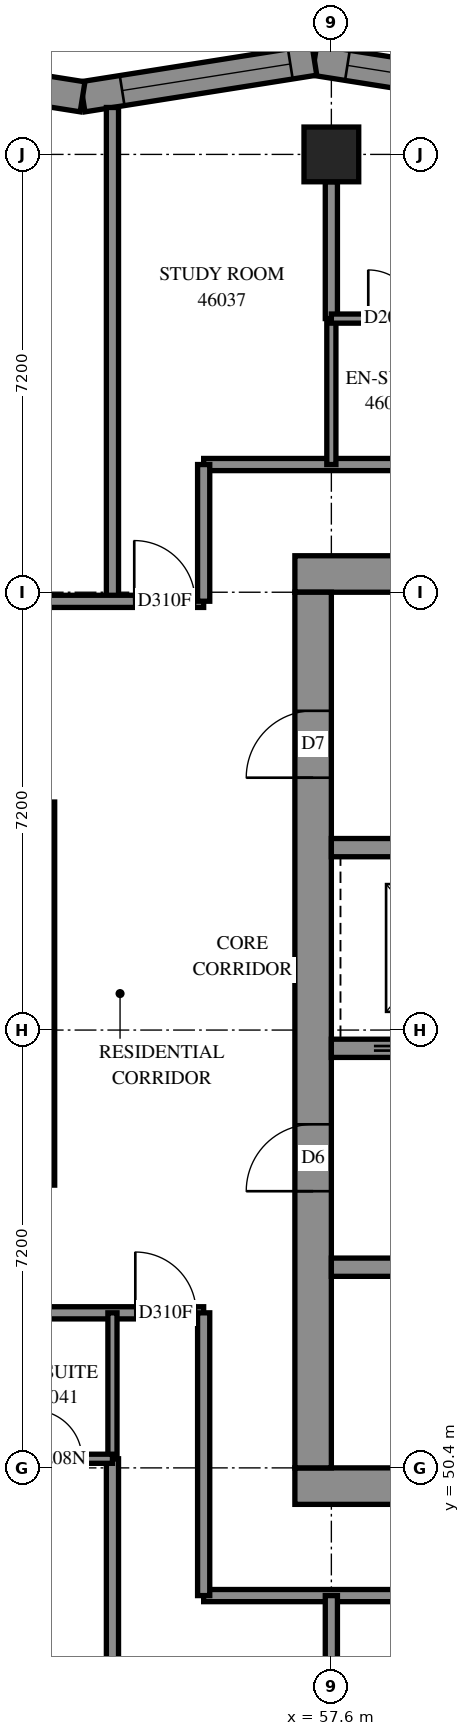
"""IFC4 building model, lengths in metres.
Left out: names, types, materials, properties, quantities, classifications, styles, units other than length and angle.
Written with IfcOpenShell. Run it as: python <this file> out.ifc"""

import sys

from ifc_helpers import new_model, si_unit, direction, frame, frame_2d, origin, origin_2d, place, context, subcontext, project, spatial, polyline, rectangle, outline, extrude, element, fill, save


model = new_model("IFC4")
c1 = context("Model", 3, precision=1e-05, world=origin(), true_north=direction((0.0, 1.0)))
c2 = subcontext(c1, "Body", "Model", "MODEL_VIEW")
j1 = project(units=[si_unit("LENGTHUNIT", "METRE"), si_unit("PLANEANGLEUNIT", "RADIAN")], contexts=[c1])
p1 = place(None, origin())
s1 = spatial("IfcSite", under=j1, at=p1, CompositionType="ELEMENT")
p2 = place(p1, origin())
s2 = spatial("IfcBuilding", under=s1, at=p2, CompositionType="ELEMENT")
p3 = place(p2, frame((0.0, 0.0, 169.4)))
s3 = spatial("IfcBuildingStorey", under=s2, at=p3, CompositionType="ELEMENT", Elevation=169.4)
p4 = place(p3, frame((57.6, 72.0, 0.0), z_axis=(0.0, 0.0, 1.0), x_axis=(1.0, 0.0, 0.0)))
e1 = element("IfcColumn", 1, at=p4, inside=s3, PredefinedType="COLUMN", context=c2, shape_type="SweptSolid", body=[
    extrude(rectangle(XDim=0.9, YDim=0.9, at=origin_2d()), origin(), (0.0, 0.0, 1.0), 3.1),
])
p5 = place(p3, frame((57.0, 50.1, -0.3), z_axis=(0.0, 0.0, 1.0), x_axis=(1.0, 0.0, 0.0)))
e2 = element("IfcWall", 2, at=p5, inside=s3, PredefinedType="SHEAR", context=c2, shape_type="SweptSolid", body=[
    extrude(rectangle(XDim=15.6, YDim=0.6, at=frame_2d((7.8, 0.0))), origin(), (0.0, 0.0, 1.0), 2.7),
])
p6 = place(p3, frame((57.0, 65.1, -0.3), z_axis=(0.0, 0.0, 1.0), x_axis=(1.0, 0.0, 0.0)))
e3 = element("IfcWall", 3, at=p6, inside=s3, PredefinedType="SHEAR", context=c2, shape_type="SweptSolid", body=[
    extrude(rectangle(XDim=15.6, YDim=0.6, at=frame_2d((7.8, 0.0))), origin(), (0.0, 0.0, 1.0), 2.7),
])
p7 = place(p6, frame((10.6, 0.0, 0.3)))
e4 = element("IfcOpeningElement", 4, at=p7, cuts=e3, PredefinedType="OPENING", context=c2, shape_type="SweptSolid", body=[
    extrude(rectangle(XDim=0.8, YDim=2.1, at=frame_2d((0.4, 1.05))), frame((0.0, 0.31, 0.0), z_axis=(0.0, -1.0, 0.0), x_axis=(1.0, 0.0, 0.0)), (0.0, 0.0, 1.0), 0.62),
])
p8 = place(p3, frame((57.3, 50.4, -0.3), z_axis=(0.0, 0.0, 1.0), x_axis=(0.0, 1.0, 0.0)))
e5 = element("IfcWall", 5, at=p8, inside=s3, PredefinedType="SHEAR", context=c2, shape_type="SweptSolid", body=[
    extrude(rectangle(XDim=14.4, YDim=0.6, at=frame_2d((7.2, 0.0))), origin(), (0.0, 0.0, 1.0), 2.7),
])
p9 = place(p8, frame((4.55, 0.0, 0.3)))
e6 = element("IfcOpeningElement", 6, at=p9, cuts=e5, PredefinedType="OPENING", context=c2, shape_type="SweptSolid", body=[
    extrude(rectangle(XDim=1.1, YDim=2.1, at=frame_2d((0.55, 1.05))), frame((0.0, 0.31, 0.0), z_axis=(0.0, -1.0, 0.0), x_axis=(1.0, 0.0, 0.0)), (0.0, 0.0, 1.0), 0.62),
])
p10 = place(p8, frame((11.35, 0.0, 0.3)))
e7 = element("IfcOpeningElement", 7, at=p10, cuts=e5, PredefinedType="OPENING", context=c2, shape_type="SweptSolid", body=[
    extrude(rectangle(XDim=1.1, YDim=2.1, at=frame_2d((0.55, 1.05))), frame((0.0, 0.31, 0.0), z_axis=(0.0, -1.0, 0.0), x_axis=(1.0, 0.0, 0.0)), (0.0, 0.0, 1.0), 0.62),
])
p11 = place(p3, frame((57.6, 53.7, 0.0), z_axis=(0.0, 0.0, 1.0), x_axis=(1.0, 0.0, 0.0)))
e8 = element("IfcWall", 8, at=p11, inside=s3, PredefinedType="SOLIDWALL", context=c2, shape_type="SweptSolid", body=[
    extrude(rectangle(XDim=14.4, YDim=0.3, at=frame_2d((7.2, 0.0))), origin(), (0.0, 0.0, 1.0), 3.1),
])
p12 = place(p11, frame((1.35, 0.0, 0.0)))
e9 = element("IfcOpeningElement", 9, at=p12, cuts=e8, PredefinedType="OPENING", context=c2, shape_type="SweptSolid", body=[
    extrude(rectangle(XDim=0.9, YDim=2.1, at=frame_2d((0.45, 1.05))), frame((0.0, 0.16, 0.0), z_axis=(0.0, -1.0, 0.0), x_axis=(1.0, 0.0, 0.0)), (0.0, 0.0, 1.0), 0.32),
])
p13 = place(p11, frame((4.95, 0.0, 0.0)))
e10 = element("IfcOpeningElement", 10, at=p13, cuts=e8, PredefinedType="OPENING", context=c2, shape_type="SweptSolid", body=[
    extrude(rectangle(XDim=0.9, YDim=2.1, at=frame_2d((0.45, 1.05))), frame((0.0, 0.16, 0.0), z_axis=(0.0, -1.0, 0.0), x_axis=(1.0, 0.0, 0.0)), (0.0, 0.0, 1.0), 0.32),
])
p14 = place(p11, frame((8.55, 0.0, 0.0)))
e11 = element("IfcOpeningElement", 11, at=p14, cuts=e8, PredefinedType="OPENING", context=c2, shape_type="SweptSolid", body=[
    extrude(rectangle(XDim=0.9, YDim=2.1, at=frame_2d((0.45, 1.05))), frame((0.0, 0.16, 0.0), z_axis=(0.0, -1.0, 0.0), x_axis=(1.0, 0.0, 0.0)), (0.0, 0.0, 1.0), 0.32),
])
p15 = place(p11, frame((12.05, 0.0, 0.0)))
e12 = element("IfcOpeningElement", 12, at=p15, cuts=e8, PredefinedType="OPENING", context=c2, shape_type="SweptSolid", body=[
    extrude(rectangle(XDim=1.1, YDim=2.1, at=frame_2d((0.55, 1.05))), frame((0.0, 0.16, 0.0), z_axis=(0.0, -1.0, 0.0), x_axis=(1.0, 0.0, 0.0)), (0.0, 0.0, 1.0), 0.32),
])
p16 = place(p3, frame((57.6, 57.3, 0.0), z_axis=(0.0, 0.0, 1.0), x_axis=(1.0, 0.0, 0.0)))
e13 = element("IfcWall", 13, at=p16, inside=s3, PredefinedType="SOLIDWALL", context=c2, shape_type="SweptSolid", body=[
    extrude(rectangle(XDim=14.4, YDim=0.3, at=frame_2d((7.2, 0.0))), origin(), (0.0, 0.0, 1.0), 3.1),
])
p17 = place(p16, frame((1.25, 0.0, 0.0)))
e14 = element("IfcOpeningElement", 14, at=p17, cuts=e13, PredefinedType="OPENING", context=c2, shape_type="SweptSolid", body=[
    extrude(rectangle(XDim=1.1, YDim=2.1, at=frame_2d((0.55, 1.05))), frame((0.0, 0.16, 0.0), z_axis=(0.0, -1.0, 0.0), x_axis=(1.0, 0.0, 0.0)), (0.0, 0.0, 1.0), 0.32),
])
p18 = place(p16, frame((4.85, 0.0, 0.0)))
e15 = element("IfcOpeningElement", 15, at=p18, cuts=e13, PredefinedType="OPENING", context=c2, shape_type="SweptSolid", body=[
    extrude(rectangle(XDim=1.1, YDim=2.1, at=frame_2d((0.55, 1.05))), frame((0.0, 0.16, 0.0), z_axis=(0.0, -1.0, 0.0), x_axis=(1.0, 0.0, 0.0)), (0.0, 0.0, 1.0), 0.32),
])
p19 = place(p16, frame((8.45, 0.0, 0.0)))
e16 = element("IfcOpeningElement", 16, at=p19, cuts=e13, PredefinedType="OPENING", context=c2, shape_type="SweptSolid", body=[
    extrude(rectangle(XDim=1.1, YDim=2.1, at=frame_2d((0.55, 1.05))), frame((0.0, 0.16, 0.0), z_axis=(0.0, -1.0, 0.0), x_axis=(1.0, 0.0, 0.0)), (0.0, 0.0, 1.0), 0.32),
])
p20 = place(p16, frame((12.05, 0.0, 0.0)))
e17 = element("IfcOpeningElement", 17, at=p20, cuts=e13, PredefinedType="OPENING", context=c2, shape_type="SweptSolid", body=[
    extrude(rectangle(XDim=1.1, YDim=2.1, at=frame_2d((0.55, 1.05))), frame((0.0, 0.16, 0.0), z_axis=(0.0, -1.0, 0.0), x_axis=(1.0, 0.0, 0.0)), (0.0, 0.0, 1.0), 0.32),
])
p21 = place(p3, frame((57.6, 60.6, 0.0), z_axis=(0.0, 0.0, 1.0), x_axis=(1.0, 0.0, 0.0)))
e18 = element("IfcWall", 18, at=p21, inside=s3, PredefinedType="SOLIDWALL", context=c2, shape_type="SweptSolid", body=[
    extrude(rectangle(XDim=7.2, YDim=0.3, at=frame_2d((3.6, 0.0))), origin(), (0.0, 0.0, 1.0), 3.1),
])
p22 = place(p3, frame((61.133, 72.947, 0.0), z_axis=(0.0, 0.0, 1.0), x_axis=(-0.9877213372, 0.1562259905, 0.0)))
e19 = element("IfcWall", 19, at=p22, inside=s3, PredefinedType="SOLIDWALL", context=c2, shape_type="SweptSolid", body=[
    extrude(outline(polyline([(0.04, -0.25), (3.899, -0.25), (3.82, 0.25), (-0.04, 0.25), (0.04, -0.25)])), origin(), (0.0, 0.0, 1.0), 3.1),
])
p23 = place(p22, frame((0.51, 0.0, 0.45)))
e20 = element("IfcOpeningElement", 20, at=p23, cuts=e19, PredefinedType="OPENING", context=c2, shape_type="SweptSolid", body=[
    extrude(rectangle(XDim=2.8, YDim=2.5, at=frame_2d((1.4, 1.25))), frame((0.0, 0.26, 0.0), z_axis=(0.0, -1.0, 0.0), x_axis=(1.0, 0.0, 0.0)), (0.0, 0.0, 1.0), 0.52),
])
p24 = place(p3, frame((57.321, 73.55, 0.0), z_axis=(0.0, 0.0, 1.0), x_axis=(-0.9877213372, -0.1562259905, 0.0)))
e21 = element("IfcWall", 21, at=p24, inside=s3, PredefinedType="SOLIDWALL", context=c2, shape_type="SweptSolid", body=[
    extrude(outline(polyline([(-0.04, -0.25), (3.82, -0.25), (3.899, 0.25), (0.04, 0.25), (-0.04, -0.25)])), origin(), (0.0, 0.0, 1.0), 3.1),
])
p25 = place(p24, frame((0.401, 0.0, 0.45)))
e22 = element("IfcOpeningElement", 22, at=p25, cuts=e21, PredefinedType="OPENING", context=c2, shape_type="SweptSolid", body=[
    extrude(rectangle(XDim=2.8, YDim=2.5, at=frame_2d((1.4, 1.25))), frame((0.0, 0.26, 0.0), z_axis=(0.0, -1.0, 0.0), x_axis=(1.0, 0.0, 0.0)), (0.0, 0.0, 1.0), 0.52),
])
p26 = place(p3, frame((53.509, 72.947, 0.0), z_axis=(0.0, 0.0, 1.0), x_axis=(-0.9877213372, 0.1562259905, 0.0)))
e23 = element("IfcWall", 23, at=p26, inside=s3, PredefinedType="SOLIDWALL", context=c2, shape_type="SweptSolid", body=[
    extrude(outline(polyline([(0.04, -0.25), (3.899, -0.25), (3.82, 0.25), (-0.04, 0.25), (0.04, -0.25)])), origin(), (0.0, 0.0, 1.0), 3.1),
])
p27 = place(p26, frame((1.074, 0.0, 0.45)))
e24 = element("IfcOpeningElement", 24, at=p27, cuts=e23, PredefinedType="OPENING", context=c2, shape_type="SweptSolid", body=[
    extrude(rectangle(XDim=1.2, YDim=2.5, at=frame_2d((0.6, 1.25))), frame((0.0, 0.26, 0.0), z_axis=(0.0, -1.0, 0.0), x_axis=(1.0, 0.0, 0.0)), (0.0, 0.0, 1.0), 0.52),
])
p28 = place(p3, frame((55.5, 48.3, 0.0), z_axis=(0.0, 0.0, 1.0), x_axis=(1.0, 0.0, 0.0)))
e25 = element("IfcWall", 25, at=p28, inside=s3, PredefinedType="PARTITIONING", context=c2, shape_type="SweptSolid", body=[
    extrude(rectangle(XDim=18.974, YDim=0.2, at=frame_2d((9.487, 0.0))), origin(), (0.0, 0.0, 1.0), 3.1),
])
p29 = place(p28, frame((5.963, 0.0, 0.0)))
e26 = element("IfcOpeningElement", 26, at=p29, cuts=e25, PredefinedType="OPENING", context=c2, shape_type="SweptSolid", body=[
    extrude(rectangle(XDim=1.0, YDim=2.1, at=frame_2d((0.5, 1.05))), frame((0.0, 0.11, 0.0), z_axis=(0.0, -1.0, 0.0), x_axis=(1.0, 0.0, 0.0)), (0.0, 0.0, 1.0), 0.22),
])
p30 = place(p28, frame((13.161, 0.0, 0.0)))
e27 = element("IfcOpeningElement", 27, at=p30, cuts=e25, PredefinedType="OPENING", context=c2, shape_type="SweptSolid", body=[
    extrude(rectangle(XDim=0.9, YDim=2.1, at=frame_2d((0.45, 1.05))), frame((0.0, 0.11, 0.0), z_axis=(0.0, -1.0, 0.0), x_axis=(1.0, 0.0, 0.0)), (0.0, 0.0, 1.0), 0.22),
])
p31 = place(p3, frame((55.5, 66.9, 0.0), z_axis=(0.0, 0.0, 1.0), x_axis=(1.0, 0.0, 0.0)))
e28 = element("IfcWall", 28, at=p31, inside=s3, PredefinedType="PARTITIONING", context=c2, shape_type="SweptSolid", body=[
    extrude(rectangle(XDim=18.6, YDim=0.2, at=frame_2d((9.3, 0.0))), origin(), (0.0, 0.0, 1.0), 3.1),
])
p32 = place(p31, frame((4.45, 0.0, 0.0)))
e29 = element("IfcOpeningElement", 29, at=p32, cuts=e28, PredefinedType="OPENING", context=c2, shape_type="SweptSolid", body=[
    extrude(rectangle(XDim=0.9, YDim=2.1, at=frame_2d((0.45, 1.05))), frame((0.0, 0.11, 0.0), z_axis=(0.0, -1.0, 0.0), x_axis=(1.0, 0.0, 0.0)), (0.0, 0.0, 1.0), 0.22),
])
p33 = place(p31, frame((6.1, 0.0, 0.0)))
e30 = element("IfcOpeningElement", 30, at=p33, cuts=e28, PredefinedType="OPENING", context=c2, shape_type="SweptSolid", body=[
    extrude(rectangle(XDim=0.9, YDim=2.1, at=frame_2d((0.45, 1.05))), frame((0.0, 0.11, 0.0), z_axis=(0.0, -1.0, 0.0), x_axis=(1.0, 0.0, 0.0)), (0.0, 0.0, 1.0), 0.22),
])
p34 = place(p31, frame((11.65, 0.0, 0.0)))
e31 = element("IfcOpeningElement", 31, at=p34, cuts=e28, PredefinedType="OPENING", context=c2, shape_type="SweptSolid", body=[
    extrude(rectangle(XDim=0.9, YDim=2.1, at=frame_2d((0.45, 1.05))), frame((0.0, 0.11, 0.0), z_axis=(0.0, -1.0, 0.0), x_axis=(1.0, 0.0, 0.0)), (0.0, 0.0, 1.0), 0.22),
])
p35 = place(p31, frame((13.3, 0.0, 0.0)))
e32 = element("IfcOpeningElement", 32, at=p35, cuts=e28, PredefinedType="OPENING", context=c2, shape_type="SweptSolid", body=[
    extrude(rectangle(XDim=0.9, YDim=2.1, at=frame_2d((0.45, 1.05))), frame((0.0, 0.11, 0.0), z_axis=(0.0, -1.0, 0.0), x_axis=(1.0, 0.0, 0.0)), (0.0, 0.0, 1.0), 0.22),
])
p36 = place(p3, frame((54.0, 42.261, 0.0), z_axis=(0.0, 0.0, 1.0), x_axis=(0.0, 1.0, 0.0)))
e33 = element("IfcWall", 33, at=p36, inside=s3, PredefinedType="PARTITIONING", context=c2, shape_type="SweptSolid", body=[
    extrude(rectangle(XDim=8.289, YDim=0.2, at=frame_2d((4.144, 0.0))), origin(), (0.0, 0.0, 1.0), 3.1),
])
p37 = place(p3, frame((54.0, 64.65, 0.0), z_axis=(0.0, 0.0, 1.0), x_axis=(0.0, 1.0, 0.0)))
e34 = element("IfcWall", 34, at=p37, inside=s3, PredefinedType="PARTITIONING", context=c2, shape_type="SweptSolid", body=[
    extrude(rectangle(XDim=8.121, YDim=0.2, at=frame_2d((4.061, 0.0))), origin(), (0.0, 0.0, 1.0), 3.1),
])
p38 = place(p3, frame((52.95, 55.05, 0.0), z_axis=(0.0, 0.0, 1.0), x_axis=(0.0, 1.0, 0.0)))
e35 = element("IfcWall", 35, at=p38, inside=s3, PredefinedType="PARTITIONING", context=c2, shape_type="SweptSolid", body=[
    extrude(rectangle(XDim=6.3, YDim=0.2, at=frame_2d((3.15, 0.0))), origin(), (0.0, 0.0, 1.0), 3.1),
])
p39 = place(p3, frame((50.4, 52.95, 0.0), z_axis=(0.0, 0.0, 1.0), x_axis=(1.0, 0.0, 0.0)))
e36 = element("IfcWall", 36, at=p39, inside=s3, PredefinedType="PARTITIONING", context=c2, shape_type="SweptSolid", body=[
    extrude(rectangle(XDim=5.1, YDim=0.2, at=frame_2d((2.55, 0.0))), origin(), (0.0, 0.0, 1.0), 3.1),
])
p40 = place(p39, frame((0.4, 0.0, 0.0)))
e37 = element("IfcOpeningElement", 37, at=p40, cuts=e36, PredefinedType="OPENING", context=c2, shape_type="SweptSolid", body=[
    extrude(rectangle(XDim=0.9, YDim=2.1, at=frame_2d((0.45, 1.05))), frame((0.0, 0.11, 0.0), z_axis=(0.0, -1.0, 0.0), x_axis=(1.0, 0.0, 0.0)), (0.0, 0.0, 1.0), 0.22),
])
p41 = place(p39, frame((3.976, 0.0, 0.0)))
e38 = element("IfcOpeningElement", 38, at=p41, cuts=e36, PredefinedType="OPENING", context=c2, shape_type="SweptSolid", body=[
    extrude(rectangle(XDim=1.0, YDim=2.1, at=frame_2d((0.5, 1.05))), frame((0.0, 0.11, 0.0), z_axis=(0.0, -1.0, 0.0), x_axis=(1.0, 0.0, 0.0)), (0.0, 0.0, 1.0), 0.22),
])
p42 = place(p3, frame((55.5, 48.3, 0.0), z_axis=(0.0, 0.0, 1.0), x_axis=(0.0, 1.0, 0.0)))
e39 = element("IfcWall", 39, at=p42, inside=s3, PredefinedType="PARTITIONING", context=c2, shape_type="SweptSolid", body=[
    extrude(rectangle(XDim=4.65, YDim=0.2, at=frame_2d((2.325, 0.0))), origin(), (0.0, 0.0, 1.0), 3.1),
])
p43 = place(p3, frame((50.85, 64.65, 0.0), z_axis=(0.0, 0.0, 1.0), x_axis=(1.0, 0.0, 0.0)))
e40 = element("IfcWall", 40, at=p43, inside=s3, PredefinedType="PARTITIONING", context=c2, shape_type="SweptSolid", body=[
    extrude(rectangle(XDim=4.65, YDim=0.2, at=frame_2d((2.325, 0.0))), origin(), (0.0, 0.0, 1.0), 3.1),
])
p44 = place(p43, frame((3.509, 0.0, 0.0)))
e41 = element("IfcOpeningElement", 41, at=p44, cuts=e40, PredefinedType="OPENING", context=c2, shape_type="SweptSolid", body=[
    extrude(rectangle(XDim=1.0, YDim=2.1, at=frame_2d((0.5, 1.05))), frame((0.0, 0.11, 0.0), z_axis=(0.0, -1.0, 0.0), x_axis=(1.0, 0.0, 0.0)), (0.0, 0.0, 1.0), 0.22),
])
p45 = place(p3, frame((57.6, 43.65, 0.0), z_axis=(0.0, 0.0, 1.0), x_axis=(0.0, 1.0, 0.0)))
e42 = element("IfcWall", 42, at=p45, inside=s3, PredefinedType="PARTITIONING", context=c2, shape_type="SweptSolid", body=[
    extrude(rectangle(XDim=4.65, YDim=0.2, at=frame_2d((2.325, 0.0))), origin(), (0.0, 0.0, 1.0), 3.1),
])
for number, where, z_axis, x_axis in (
    (43, (54.0, 50.55, 0.0), (0.0, 0.0, 1.0), (0.0, 1.0, 0.0)),
    (44, (57.6, 66.9, 0.0), (0.0, 0.0, 1.0), (0.0, 1.0, 0.0)),
):
    element("IfcWall", number, at=place(p3, frame(where, z_axis=z_axis, x_axis=x_axis)), inside=s3, PredefinedType="PARTITIONING", context=c2, shape_type="SweptSolid", body=[
        extrude(rectangle(XDim=2.4, YDim=0.15, at=frame_2d((1.2, 0.0))), origin(), (0.0, 0.0, 1.0), 3.1),
    ])
p46 = place(p3, frame((57.6, 69.3, 0.0), z_axis=(0.0, 0.0, 1.0), x_axis=(0.0, 1.0, 0.0)))
e45 = element("IfcWall", 45, at=p46, inside=s3, PredefinedType="PARTITIONING", context=c2, shape_type="SweptSolid", body=[
    extrude(rectangle(XDim=2.25, YDim=0.2, at=frame_2d((1.125, 0.0))), origin(), (0.0, 0.0, 1.0), 3.1),
])
p47 = place(p3, frame((55.5, 64.652, 0.0), z_axis=(0.0, 0.0, 1.0), x_axis=(0.0, 1.0, 0.0)))
e46 = element("IfcWall", 46, at=p47, inside=s3, PredefinedType="PARTITIONING", context=c2, shape_type="SweptSolid", body=[
    extrude(rectangle(XDim=2.248, YDim=0.2, at=frame_2d((1.124, 0.0))), origin(), (0.0, 0.0, 1.0), 3.1),
])
p48 = place(p3, frame((52.1, 50.55, 0.0), z_axis=(0.0, 0.0, 1.0), x_axis=(1.0, 0.0, 0.0)))
e47 = element("IfcWall", 47, at=p48, inside=s3, PredefinedType="PARTITIONING", context=c2, shape_type="SweptSolid", body=[
    extrude(rectangle(XDim=1.9, YDim=0.15, at=frame_2d((0.95, 0.0))), origin(), (0.0, 0.0, 1.0), 3.1),
])
p49 = place(p48, frame((0.598, 0.0, 0.0)))
e48 = element("IfcOpeningElement", 48, at=p49, cuts=e47, PredefinedType="OPENING", context=c2, shape_type="SweptSolid", body=[
    extrude(rectangle(XDim=0.8, YDim=2.1, at=frame_2d((0.4, 1.05))), frame((0.0, 0.085, 0.0), z_axis=(0.0, -1.0, 0.0), x_axis=(1.0, 0.0, 0.0)), (0.0, 0.0, 1.0), 0.17),
])
p50 = place(p3, frame((57.6, 69.3, 0.0), z_axis=(0.0, 0.0, 1.0), x_axis=(1.0, 0.0, 0.0)))
e49 = element("IfcWall", 49, at=p50, inside=s3, PredefinedType="PARTITIONING", context=c2, shape_type="SweptSolid", body=[
    extrude(rectangle(XDim=1.9, YDim=0.15, at=frame_2d((0.95, 0.0))), origin(), (0.0, 0.0, 1.0), 3.1),
])
p51 = place(p50, frame((0.607, 0.0, 0.0)))
e50 = element("IfcOpeningElement", 50, at=p51, cuts=e49, PredefinedType="OPENING", context=c2, shape_type="SweptSolid", body=[
    extrude(rectangle(XDim=0.8, YDim=2.1, at=frame_2d((0.4, 1.05))), frame((0.0, 0.085, 0.0), z_axis=(0.0, -1.0, 0.0), x_axis=(1.0, 0.0, 0.0)), (0.0, 0.0, 1.0), 0.17),
])
p52 = place(p23, origin())
e51 = element("IfcWindow", 51, at=p52, inside=s3, PartitioningType="SINGLE_PANEL", PredefinedType="WINDOW", context=c2, shape_type="SweptSolid", body=[
    extrude(rectangle(XDim=2.8, YDim=2.5, at=frame_2d((1.4, 1.25))), frame((0.0, 0.18, 0.0), z_axis=(0.0, -1.0, 0.0), x_axis=(1.0, 0.0, 0.0)), (0.0, 0.0, 1.0), 0.06),
])
fill(e20, e51)
p53 = place(p25, origin())
e52 = element("IfcWindow", 52, at=p53, inside=s3, PartitioningType="SINGLE_PANEL", PredefinedType="WINDOW", context=c2, shape_type="SweptSolid", body=[
    extrude(rectangle(XDim=2.8, YDim=2.5, at=frame_2d((1.4, 1.25))), frame((0.0, 0.18, 0.0), z_axis=(0.0, -1.0, 0.0), x_axis=(1.0, 0.0, 0.0)), (0.0, 0.0, 1.0), 0.06),
])
fill(e22, e52)
p54 = place(p9, origin())
e53 = element("IfcDoor", 53, at=p54, inside=s3, OperationType="DOUBLE_DOOR_SINGLE_SWING", PredefinedType="DOOR", context=c2, shape_type="SweptSolid", body=[
    extrude(rectangle(XDim=1.1, YDim=2.1, at=frame_2d((0.55, 1.05))), frame((0.0, 0.025, 0.0), z_axis=(0.0, -1.0, 0.0), x_axis=(1.0, 0.0, 0.0)), (0.0, 0.0, 1.0), 0.05),
])
fill(e6, e53)
p55 = place(p10, origin())
e54 = element("IfcDoor", 54, at=p55, inside=s3, OperationType="SINGLE_SWING_LEFT", PredefinedType="DOOR", context=c2, shape_type="SweptSolid", body=[
    extrude(rectangle(XDim=1.1, YDim=2.1, at=frame_2d((0.55, 1.05))), frame((0.0, 0.025, 0.0), z_axis=(0.0, -1.0, 0.0), x_axis=(1.0, 0.0, 0.0)), (0.0, 0.0, 1.0), 0.05),
])
fill(e7, e54)
p56 = place(p44, origin())
e55 = element("IfcDoor", 55, at=p56, inside=s3, OperationType="SINGLE_SWING_LEFT", PredefinedType="DOOR", context=c2, shape_type="SweptSolid", body=[
    extrude(rectangle(XDim=1.0, YDim=2.1, at=frame_2d((0.5, 1.05))), frame((0.0, 0.025, 0.0), z_axis=(0.0, -1.0, 0.0), x_axis=(1.0, 0.0, 0.0)), (0.0, 0.0, 1.0), 0.05),
])
fill(e41, e55)
p57 = place(p49, origin())
e56 = element("IfcDoor", 56, at=p57, inside=s3, OperationType="SINGLE_SWING_RIGHT", PredefinedType="DOOR", context=c2, shape_type="SweptSolid", body=[
    extrude(rectangle(XDim=0.8, YDim=2.1, at=frame_2d((0.4, 1.05))), frame((0.0, 0.025, 0.0), z_axis=(0.0, -1.0, 0.0), x_axis=(1.0, 0.0, 0.0)), (0.0, 0.0, 1.0), 0.05),
])
fill(e48, e56)
p58 = place(p41, origin())
e57 = element("IfcDoor", 57, at=p58, inside=s3, OperationType="SINGLE_SWING_RIGHT", PredefinedType="DOOR", context=c2, shape_type="SweptSolid", body=[
    extrude(rectangle(XDim=1.0, YDim=2.1, at=frame_2d((0.5, 1.05))), frame((0.0, 0.025, 0.0), z_axis=(0.0, -1.0, 0.0), x_axis=(1.0, 0.0, 0.0)), (0.0, 0.0, 1.0), 0.05),
])
fill(e38, e57)
p59 = place(p51, origin())
e58 = element("IfcDoor", 58, at=p59, inside=s3, OperationType="SINGLE_SWING_RIGHT", PredefinedType="DOOR", context=c2, shape_type="SweptSolid", body=[
    extrude(rectangle(XDim=0.8, YDim=2.1, at=frame_2d((0.4, 1.05))), frame((0.0, 0.025, 0.0), z_axis=(0.0, -1.0, 0.0), x_axis=(1.0, 0.0, 0.0)), (0.0, 0.0, 1.0), 0.05),
])
fill(e50, e58)
save(model, sys.argv[1])
